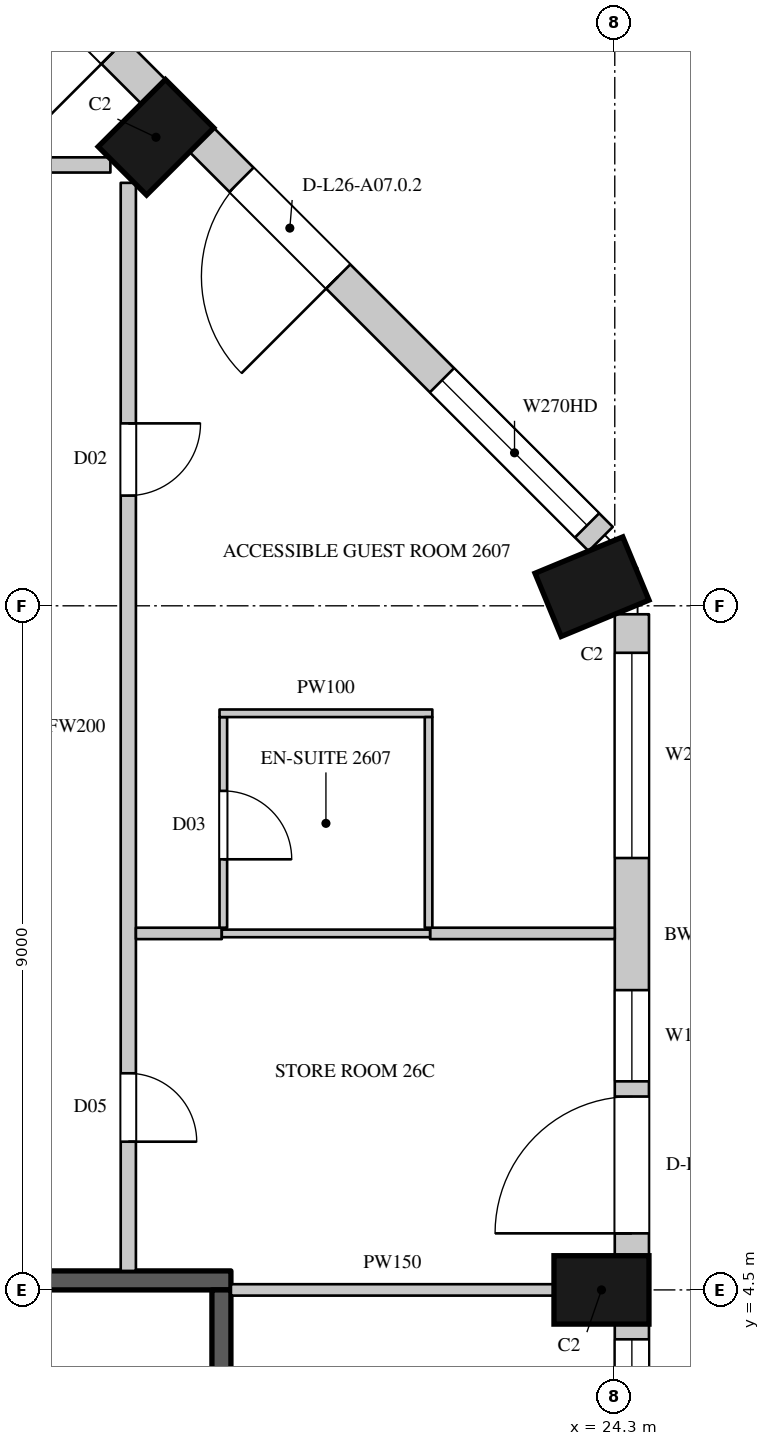
"""IFC4 building model, lengths in metres.
Left out: names, types, materials, properties, quantities, classifications, styles, units other than length and angle.
Written with IfcOpenShell. Run it as: python <this file> out.ifc"""

import sys

from ifc_helpers import new_model, si_unit, direction, frame, frame_2d, origin, origin_2d, place, context, subcontext, project, spatial, rectangle, extrude, element, fill, save


model = new_model("IFC4")
c1 = context("Model", 3, precision=1e-05, world=origin(), true_north=direction((0.0, 1.0)))
c2 = subcontext(c1, "Body", "Model", "MODEL_VIEW")
j1 = project(units=[si_unit("LENGTHUNIT", "METRE"), si_unit("PLANEANGLEUNIT", "RADIAN")], contexts=[c1])
p1 = place(None, origin())
s1 = spatial("IfcSite", under=j1, at=p1, CompositionType="ELEMENT")
p2 = place(p1, origin())
s2 = spatial("IfcBuilding", under=s1, at=p2, CompositionType="ELEMENT")
p3 = place(p2, frame((0.0, 0.0, 123.9)))
s3 = spatial("IfcBuildingStorey", under=s2, at=p3, CompositionType="ELEMENT", Elevation=123.9)
for number, where, z_axis, x_axis in (
    (1, (24.125, 4.5, 0.0), (0.0, 0.0, 1.0), (0.0, 1.0, 0.0)),
    (2, (24.0, 13.752, 0.0), (0.0, 0.0, 1.0), (-0.383, 0.924, 0.0)),
    (3, (18.264, 19.664, 0.0), (0.0, 0.0, 1.0), (-0.707, 0.707, 0.0)),
):
    element("IfcColumn", number, at=place(p3, frame(where, z_axis=z_axis, x_axis=x_axis)), inside=s3, PredefinedType="COLUMN", context=c2, shape_type="SweptSolid", body=[
        extrude(rectangle(XDim=0.9, YDim=1.25, at=origin_2d()), origin(), (0.0, 0.0, 1.0), 3.6),
    ])
p4 = place(p3, frame((24.525, -4.05, 0.0), z_axis=(0.0, 0.0, 1.0), x_axis=(0.0, 1.0, 0.0)))
e4 = element("IfcWall", 4, at=p4, inside=s3, PredefinedType="SOLIDWALL", context=c2, shape_type="SweptSolid", body=[
    extrude(rectangle(XDim=8.1, YDim=0.45, at=frame_2d((4.05, 0.0))), origin(), (0.0, 0.0, 1.0), 3.3),
])
p5 = place(p4, frame((0.2, 0.0, 0.0)))
e5 = element("IfcOpeningElement", 5, at=p5, cuts=e4, PredefinedType="OPENING", context=c2, shape_type="SweptSolid", body=[
    extrude(rectangle(XDim=1.8, YDim=2.4, at=frame_2d((0.9, 1.2))), frame((0.0, 0.235, 0.0), z_axis=(0.0, -1.0, 0.0), x_axis=(1.0, 0.0, 0.0)), (0.0, 0.0, 1.0), 0.47),
])
p6 = place(p4, frame((2.2, 0.0, 1.05)))
e6 = element("IfcOpeningElement", 6, at=p6, cuts=e4, PredefinedType="OPENING", context=c2, shape_type="SweptSolid", body=[
    extrude(rectangle(XDim=1.2, YDim=2.0, at=frame_2d((0.6, 1.0))), frame((0.0, 0.235, 0.0), z_axis=(0.0, -1.0, 0.0), x_axis=(1.0, 0.0, 0.0)), (0.0, 0.0, 1.0), 0.47),
])
p7 = place(p4, frame((4.7, 0.0, 0.0)))
e7 = element("IfcOpeningElement", 7, at=p7, cuts=e4, PredefinedType="OPENING", context=c2, shape_type="SweptSolid", body=[
    extrude(rectangle(XDim=1.8, YDim=2.4, at=frame_2d((0.9, 1.2))), frame((0.0, 0.235, 0.0), z_axis=(0.0, -1.0, 0.0), x_axis=(1.0, 0.0, 0.0)), (0.0, 0.0, 1.0), 0.47),
])
p8 = place(p4, frame((6.7, 0.0, 1.05)))
e8 = element("IfcOpeningElement", 8, at=p8, cuts=e4, PredefinedType="OPENING", context=c2, shape_type="SweptSolid", body=[
    extrude(rectangle(XDim=1.2, YDim=2.0, at=frame_2d((0.6, 1.0))), frame((0.0, 0.235, 0.0), z_axis=(0.0, -1.0, 0.0), x_axis=(1.0, 0.0, 0.0)), (0.0, 0.0, 1.0), 0.47),
])
p9 = place(p3, frame((24.525, 4.95, 0.0), z_axis=(0.0, 0.0, 1.0), x_axis=(0.0, 1.0, 0.0)))
e9 = element("IfcWall", 9, at=p9, inside=s3, PredefinedType="SOLIDWALL", context=c2, shape_type="SweptSolid", body=[
    extrude(rectangle(XDim=8.439, YDim=0.45, at=frame_2d((4.219, 0.0))), origin(), (0.0, 0.0, 1.0), 3.3),
])
p10 = place(p9, frame((0.294, 0.0, 0.0)))
e10 = element("IfcOpeningElement", 10, at=p10, cuts=e9, PredefinedType="OPENING", context=c2, shape_type="SweptSolid", body=[
    extrude(rectangle(XDim=1.8, YDim=2.4, at=frame_2d((0.9, 1.2))), frame((0.0, 0.235, 0.0), z_axis=(0.0, -1.0, 0.0), x_axis=(1.0, 0.0, 0.0)), (0.0, 0.0, 1.0), 0.47),
])
p11 = place(p9, frame((2.294, 0.0, 1.05)))
e11 = element("IfcOpeningElement", 11, at=p11, cuts=e9, PredefinedType="OPENING", context=c2, shape_type="SweptSolid", body=[
    extrude(rectangle(XDim=1.2, YDim=2.0, at=frame_2d((0.6, 1.0))), frame((0.0, 0.235, 0.0), z_axis=(0.0, -1.0, 0.0), x_axis=(1.0, 0.0, 0.0)), (0.0, 0.0, 1.0), 0.47),
])
p12 = place(p9, frame((5.232, 0.0, 1.05)))
e12 = element("IfcOpeningElement", 12, at=p12, cuts=e9, PredefinedType="OPENING", context=c2, shape_type="SweptSolid", body=[
    extrude(rectangle(XDim=2.7, YDim=2.0, at=frame_2d((1.35, 1.0))), frame((0.0, 0.235, 0.0), z_axis=(0.0, -1.0, 0.0), x_axis=(1.0, 0.0, 0.0)), (0.0, 0.0, 1.0), 0.47),
])
p13 = place(p3, frame((24.115, 14.379, 0.0), z_axis=(0.0, 0.0, 1.0), x_axis=(-0.707106781187, 0.707106781187, 0.0)))
e13 = element("IfcWall", 13, at=p13, inside=s3, PredefinedType="SOLIDWALL", context=c2, shape_type="SweptSolid", body=[
    extrude(rectangle(XDim=7.424, YDim=0.45, at=frame_2d((3.712, 0.0))), origin(), (0.0, 0.0, 1.0), 3.3),
])
p14 = place(p13, frame((0.253, 0.0, 1.05)))
e14 = element("IfcOpeningElement", 14, at=p14, cuts=e13, PredefinedType="OPENING", context=c2, shape_type="SweptSolid", body=[
    extrude(rectangle(XDim=2.7, YDim=2.0, at=frame_2d((1.35, 1.0))), frame((0.0, 0.235, 0.0), z_axis=(0.0, -1.0, 0.0), x_axis=(1.0, 0.0, 0.0)), (0.0, 0.0, 1.0), 0.47),
])
p15 = place(p13, frame((4.884, 0.0, 0.0)))
e15 = element("IfcOpeningElement", 15, at=p15, cuts=e13, PredefinedType="OPENING", context=c2, shape_type="SweptSolid", body=[
    extrude(rectangle(XDim=1.8, YDim=2.4, at=frame_2d((0.9, 1.2))), frame((0.0, 0.235, 0.0), z_axis=(0.0, -1.0, 0.0), x_axis=(1.0, 0.0, 0.0)), (0.0, 0.0, 1.0), 0.47),
])
p16 = place(p3, frame((18.229, 20.265, 0.0), z_axis=(0.0, 0.0, 1.0), x_axis=(-0.707106781187, 0.707106781187, 0.0)))
e16 = element("IfcWall", 16, at=p16, inside=s3, PredefinedType="SOLIDWALL", context=c2, shape_type="SweptSolid", body=[
    extrude(rectangle(XDim=7.424, YDim=0.45, at=frame_2d((3.712, 0.0))), origin(), (0.0, 0.0, 1.0), 3.3),
])
p17 = place(p16, frame((0.74, 0.0, 0.0)))
e17 = element("IfcOpeningElement", 17, at=p17, cuts=e16, PredefinedType="OPENING", context=c2, shape_type="SweptSolid", body=[
    extrude(rectangle(XDim=1.8, YDim=2.4, at=frame_2d((0.9, 1.2))), frame((0.0, 0.235, 0.0), z_axis=(0.0, -1.0, 0.0), x_axis=(1.0, 0.0, 0.0)), (0.0, 0.0, 1.0), 0.47),
])
p18 = place(p16, frame((4.471, 0.0, 1.05)))
e18 = element("IfcOpeningElement", 18, at=p18, cuts=e16, PredefinedType="OPENING", context=c2, shape_type="SweptSolid", body=[
    extrude(rectangle(XDim=2.7, YDim=2.0, at=frame_2d((1.35, 1.0))), frame((0.0, 0.235, 0.0), z_axis=(0.0, -1.0, 0.0), x_axis=(1.0, 0.0, 0.0)), (0.0, 0.0, 1.0), 0.47),
])
p19 = place(p3, frame((23.15, 16.864, 0.0), z_axis=(0.0, 0.0, 1.0), x_axis=(-0.707106781187, 0.707106781187, 0.0)))
e19 = element("IfcWall", 19, at=p19, inside=s3, PredefinedType="SOLIDWALL", context=c2, shape_type="SweptSolid", body=[
    extrude(rectangle(XDim=1.445, YDim=0.45, at=frame_2d((0.722, 0.0))), origin(), (0.0, 0.0, 1.0), 0.6),
])
p20 = place(p3, frame((19.937, 20.078, 0.0), z_axis=(0.0, 0.0, 1.0), x_axis=(-0.707106781187, 0.707106781187, 0.0)))
e20 = element("IfcWall", 20, at=p20, inside=s3, PredefinedType="SOLIDWALL", context=c2, shape_type="SweptSolid", body=[
    extrude(rectangle(XDim=1.781, YDim=0.45, at=frame_2d((0.89, 0.0))), origin(), (0.0, 0.0, 1.0), 0.6),
])
p21 = place(p3, frame((-20.8, 19.3, 0.0), z_axis=(0.0, 0.0, 1.0), x_axis=(1.0, 0.0, 0.0)))
e21 = element("IfcWall", 21, at=p21, inside=s3, PredefinedType="PARTITIONING", context=c2, shape_type="SweptSolid", body=[
    extrude(rectangle(XDim=38.464, YDim=0.2, at=frame_2d((19.232, 0.0))), origin(), (0.0, 0.0, 1.0), 3.3),
])
p22 = place(p21, frame((24.05, 0.0, 0.0)))
e22 = element("IfcOpeningElement", 22, at=p22, cuts=e21, PredefinedType="OPENING", context=c2, shape_type="SweptSolid", body=[
    extrude(rectangle(XDim=0.9, YDim=2.2, at=frame_2d((0.45, 1.1))), frame((0.0, 0.11, 0.0), z_axis=(0.0, -1.0, 0.0), x_axis=(1.0, 0.0, 0.0)), (0.0, 0.0, 1.0), 0.22),
])
p23 = place(p21, frame((11.2, 0.0, 0.0)))
e23 = element("IfcOpeningElement", 23, at=p23, cuts=e21, PredefinedType="OPENING", context=c2, shape_type="SweptSolid", body=[
    extrude(rectangle(XDim=0.95, YDim=2.2, at=frame_2d((0.475, 1.1))), frame((0.0, 0.11, 0.0), z_axis=(0.0, -1.0, 0.0), x_axis=(1.0, 0.0, 0.0)), (0.0, 0.0, 1.0), 0.22),
])
p24 = place(p21, frame((15.05, 0.0, 0.0)))
e24 = element("IfcOpeningElement", 24, at=p24, cuts=e21, PredefinedType="OPENING", context=c2, shape_type="SweptSolid", body=[
    extrude(rectangle(XDim=0.95, YDim=2.2, at=frame_2d((0.475, 1.1))), frame((0.0, 0.11, 0.0), z_axis=(0.0, -1.0, 0.0), x_axis=(1.0, 0.0, 0.0)), (0.0, 0.0, 1.0), 0.22),
])
p25 = place(p21, frame((32.0, 0.0, 0.0)))
e25 = element("IfcOpeningElement", 25, at=p25, cuts=e21, PredefinedType="OPENING", context=c2, shape_type="SweptSolid", body=[
    extrude(rectangle(XDim=0.95, YDim=2.2, at=frame_2d((0.475, 1.1))), frame((0.0, 0.11, 0.0), z_axis=(0.0, -1.0, 0.0), x_axis=(1.0, 0.0, 0.0)), (0.0, 0.0, 1.0), 0.22),
])
p26 = place(p3, frame((17.9, 4.75, 0.0), z_axis=(0.0, 0.0, 1.0), x_axis=(0.0, 1.0, 0.0)))
e26 = element("IfcWall", 26, at=p26, inside=s3, PredefinedType="PARTITIONING", context=c2, shape_type="SweptSolid", body=[
    extrude(rectangle(XDim=14.314, YDim=0.2, at=frame_2d((7.157, 0.0))), origin(), (0.0, 0.0, 1.0), 3.3),
])
p27 = place(p26, frame((1.7, 0.0, 0.0)))
e27 = element("IfcOpeningElement", 27, at=p27, cuts=e26, PredefinedType="OPENING", context=c2, shape_type="SweptSolid", body=[
    extrude(rectangle(XDim=0.9, YDim=2.2, at=frame_2d((0.45, 1.1))), frame((0.0, 0.11, 0.0), z_axis=(0.0, -1.0, 0.0), x_axis=(1.0, 0.0, 0.0)), (0.0, 0.0, 1.0), 0.22),
])
p28 = place(p26, frame((10.2, 0.0, 0.0)))
e28 = element("IfcOpeningElement", 28, at=p28, cuts=e26, PredefinedType="OPENING", context=c2, shape_type="SweptSolid", body=[
    extrude(rectangle(XDim=0.95, YDim=2.2, at=frame_2d((0.475, 1.1))), frame((0.0, 0.11, 0.0), z_axis=(0.0, -1.0, 0.0), x_axis=(1.0, 0.0, 0.0)), (0.0, 0.0, 1.0), 0.22),
])
p29 = place(p3, frame((18.0, 9.19, 0.0), z_axis=(0.0, 0.0, 1.0), x_axis=(1.0, 0.0, 0.0)))
e29 = element("IfcWall", 29, at=p29, inside=s3, PredefinedType="PARTITIONING", context=c2, shape_type="SweptSolid", body=[
    extrude(rectangle(XDim=1.13, YDim=0.15, at=frame_2d((0.565, 0.0))), origin(), (0.0, 0.0, 1.0), 2.65),
])
p30 = place(p3, frame((19.25, 4.5, 0.0), z_axis=(0.0, 0.0, 1.0), x_axis=(1.0, 0.0, 0.0)))
e30 = element("IfcWall", 30, at=p30, inside=s3, PredefinedType="PARTITIONING", context=c2, shape_type="SweptSolid", body=[
    extrude(rectangle(XDim=4.25, YDim=0.15, at=frame_2d((2.125, 0.0))), origin(), (0.0, 0.0, 1.0), 3.3),
])
p31 = place(p3, frame((21.87, 9.19, 0.0), z_axis=(0.0, 0.0, 1.0), x_axis=(1.0, 0.0, 0.0)))
e31 = element("IfcWall", 31, at=p31, inside=s3, PredefinedType="PARTITIONING", context=c2, shape_type="SweptSolid", body=[
    extrude(rectangle(XDim=2.43, YDim=0.15, at=frame_2d((1.215, 0.0))), origin(), (0.0, 0.0, 1.0), 2.65),
])
p32 = place(p3, frame((14.55, 4.625, 0.0), z_axis=(0.0, 0.0, 1.0), x_axis=(1.0, 0.0, 0.0)))
e32 = element("IfcWall", 32, at=p32, inside=s3, PredefinedType="SHEAR", context=c2, shape_type="SweptSolid", body=[
    extrude(rectangle(XDim=4.7, YDim=0.25, at=frame_2d((2.35, 0.0))), origin(), (0.0, 0.0, 1.0), 3.3),
])
p33 = place(p3, frame((19.125, -4.5, 0.0), z_axis=(0.0, 0.0, 1.0), x_axis=(0.0, 1.0, 0.0)))
e33 = element("IfcWall", 33, at=p33, inside=s3, PredefinedType="SHEAR", context=c2, shape_type="SweptSolid", body=[
    extrude(rectangle(XDim=9.0, YDim=0.25, at=frame_2d((4.5, 0.0))), origin(), (0.0, 0.0, 1.0), 3.3),
])
p34 = place(p3, frame((19.13, 9.19, 0.0), z_axis=(0.0, 0.0, 1.0), x_axis=(1.0, 0.0, 0.0)))
e34 = element("IfcWall", 34, at=p34, inside=s3, PredefinedType="PARTITIONING", context=c2, shape_type="SweptSolid", body=[
    extrude(rectangle(XDim=2.74, YDim=0.1, at=frame_2d((1.37, 0.0))), origin(), (0.0, 0.0, 1.0), 2.65),
])
p35 = place(p3, frame((19.15, 9.265, 0.0), z_axis=(0.0, 0.0, 1.0), x_axis=(0.0, 1.0, 0.0)))
e35 = element("IfcWall", 35, at=p35, inside=s3, PredefinedType="PARTITIONING", context=c2, shape_type="SweptSolid", body=[
    extrude(rectangle(XDim=2.771, YDim=0.1, at=frame_2d((1.385, 0.0))), origin(), (0.0, 0.0, 1.0), 3.3),
])
p36 = place(p35, frame((0.9, 0.0, 0.0)))
e36 = element("IfcOpeningElement", 36, at=p36, cuts=e35, PredefinedType="OPENING", context=c2, shape_type="SweptSolid", body=[
    extrude(rectangle(XDim=0.9, YDim=2.2, at=frame_2d((0.45, 1.1))), frame((0.0, 0.06, 0.0), z_axis=(0.0, -1.0, 0.0), x_axis=(1.0, 0.0, 0.0)), (0.0, 0.0, 1.0), 0.12),
])
p37 = place(p3, frame((19.1, 12.086, 0.0), z_axis=(0.0, 0.0, 1.0), x_axis=(1.0, 0.0, 0.0)))
e37 = element("IfcWall", 37, at=p37, inside=s3, PredefinedType="PARTITIONING", context=c2, shape_type="SweptSolid", body=[
    extrude(rectangle(XDim=2.8, YDim=0.1, at=frame_2d((1.4, 0.0))), origin(), (0.0, 0.0, 1.0), 3.3),
])
p38 = place(p3, frame((21.85, 9.265, 0.0), z_axis=(0.0, 0.0, 1.0), x_axis=(0.0, 1.0, 0.0)))
e38 = element("IfcWall", 38, at=p38, inside=s3, PredefinedType="PARTITIONING", context=c2, shape_type="SweptSolid", body=[
    extrude(rectangle(XDim=2.771, YDim=0.1, at=frame_2d((1.385, 0.0))), origin(), (0.0, 0.0, 1.0), 3.3),
])
p39 = place(p8, origin())
e39 = element("IfcWindow", 39, at=p39, inside=s3, PartitioningType="SINGLE_PANEL", PredefinedType="WINDOW", context=c2, shape_type="SweptSolid", body=[
    extrude(rectangle(XDim=1.2, YDim=2.0, at=frame_2d((0.6, 1.0))), frame((0.0, 0.135, 0.0), z_axis=(0.0, -1.0, 0.0), x_axis=(1.0, 0.0, 0.0)), (0.0, 0.0, 1.0), 0.06),
])
fill(e8, e39)
p40 = place(p10, origin())
e40 = element("IfcDoor", 40, at=p40, inside=s3, OperationType="SLIDING_TO_LEFT", PredefinedType="DOOR", context=c2, shape_type="SweptSolid", body=[
    extrude(rectangle(XDim=1.8, YDim=2.4, at=frame_2d((0.9, 1.2))), frame((0.0, 0.13, 0.0), z_axis=(0.0, -1.0, 0.0), x_axis=(1.0, 0.0, 0.0)), (0.0, 0.0, 1.0), 0.05),
])
fill(e10, e40)
p41 = place(p11, origin())
e41 = element("IfcWindow", 41, at=p41, inside=s3, PartitioningType="SINGLE_PANEL", PredefinedType="WINDOW", context=c2, shape_type="SweptSolid", body=[
    extrude(rectangle(XDim=1.2, YDim=2.0, at=frame_2d((0.6, 1.0))), frame((0.0, 0.135, 0.0), z_axis=(0.0, -1.0, 0.0), x_axis=(1.0, 0.0, 0.0)), (0.0, 0.0, 1.0), 0.06),
])
fill(e11, e41)
p42 = place(p12, origin())
e42 = element("IfcWindow", 42, at=p42, inside=s3, PartitioningType="SINGLE_PANEL", PredefinedType="WINDOW", context=c2, shape_type="SweptSolid", body=[
    extrude(rectangle(XDim=2.7, YDim=2.0, at=frame_2d((1.35, 1.0))), frame((0.0, 0.135, 0.0), z_axis=(0.0, -1.0, 0.0), x_axis=(1.0, 0.0, 0.0)), (0.0, 0.0, 1.0), 0.06),
])
fill(e12, e42)
p43 = place(p14, origin())
e43 = element("IfcWindow", 43, at=p43, inside=s3, PartitioningType="SINGLE_PANEL", PredefinedType="WINDOW", context=c2, shape_type="SweptSolid", body=[
    extrude(rectangle(XDim=2.7, YDim=2.0, at=frame_2d((1.35, 1.0))), frame((0.0, 0.135, 0.0), z_axis=(0.0, -1.0, 0.0), x_axis=(1.0, 0.0, 0.0)), (0.0, 0.0, 1.0), 0.06),
])
fill(e14, e43)
p44 = place(p15, origin())
e44 = element("IfcDoor", 44, at=p44, inside=s3, OperationType="SLIDING_TO_LEFT", PredefinedType="DOOR", context=c2, shape_type="SweptSolid", body=[
    extrude(rectangle(XDim=1.8, YDim=2.4, at=frame_2d((0.9, 1.2))), frame((0.0, 0.13, 0.0), z_axis=(0.0, -1.0, 0.0), x_axis=(1.0, 0.0, 0.0)), (0.0, 0.0, 1.0), 0.05),
])
fill(e15, e44)
p45 = place(p17, origin())
e45 = element("IfcDoor", 45, at=p45, inside=s3, OperationType="SLIDING_TO_LEFT", PredefinedType="DOOR", context=c2, shape_type="SweptSolid", body=[
    extrude(rectangle(XDim=1.8, YDim=2.4, at=frame_2d((0.9, 1.2))), frame((0.0, 0.13, 0.0), z_axis=(0.0, -1.0, 0.0), x_axis=(1.0, 0.0, 0.0)), (0.0, 0.0, 1.0), 0.05),
])
fill(e17, e45)
p46 = place(p27, origin())
e46 = element("IfcDoor", 46, at=p46, inside=s3, OperationType="SINGLE_SWING_RIGHT", PredefinedType="DOOR", context=c2, shape_type="SweptSolid", body=[
    extrude(rectangle(XDim=0.9, YDim=2.2, at=frame_2d((0.45, 1.1))), frame((0.0, 0.025, 0.0), z_axis=(0.0, -1.0, 0.0), x_axis=(1.0, 0.0, 0.0)), (0.0, 0.0, 1.0), 0.05),
])
fill(e27, e46)
p47 = place(p28, origin())
e47 = element("IfcDoor", 47, at=p47, inside=s3, OperationType="SINGLE_SWING_LEFT", PredefinedType="DOOR", context=c2, shape_type="SweptSolid", body=[
    extrude(rectangle(XDim=0.95, YDim=2.2, at=frame_2d((0.475, 1.1))), frame((0.0, 0.025, 0.0), z_axis=(0.0, -1.0, 0.0), x_axis=(1.0, 0.0, 0.0)), (0.0, 0.0, 1.0), 0.05),
])
fill(e28, e47)
p48 = place(p36, origin())
e48 = element("IfcDoor", 48, at=p48, inside=s3, OperationType="SINGLE_SWING_RIGHT", PredefinedType="DOOR", context=c2, shape_type="SweptSolid", body=[
    extrude(rectangle(XDim=0.9, YDim=2.2, at=frame_2d((0.45, 1.1))), frame((0.0, 0.025, 0.0), z_axis=(0.0, -1.0, 0.0), x_axis=(1.0, 0.0, 0.0)), (0.0, 0.0, 1.0), 0.05),
])
fill(e36, e48)
save(model, sys.argv[1])
